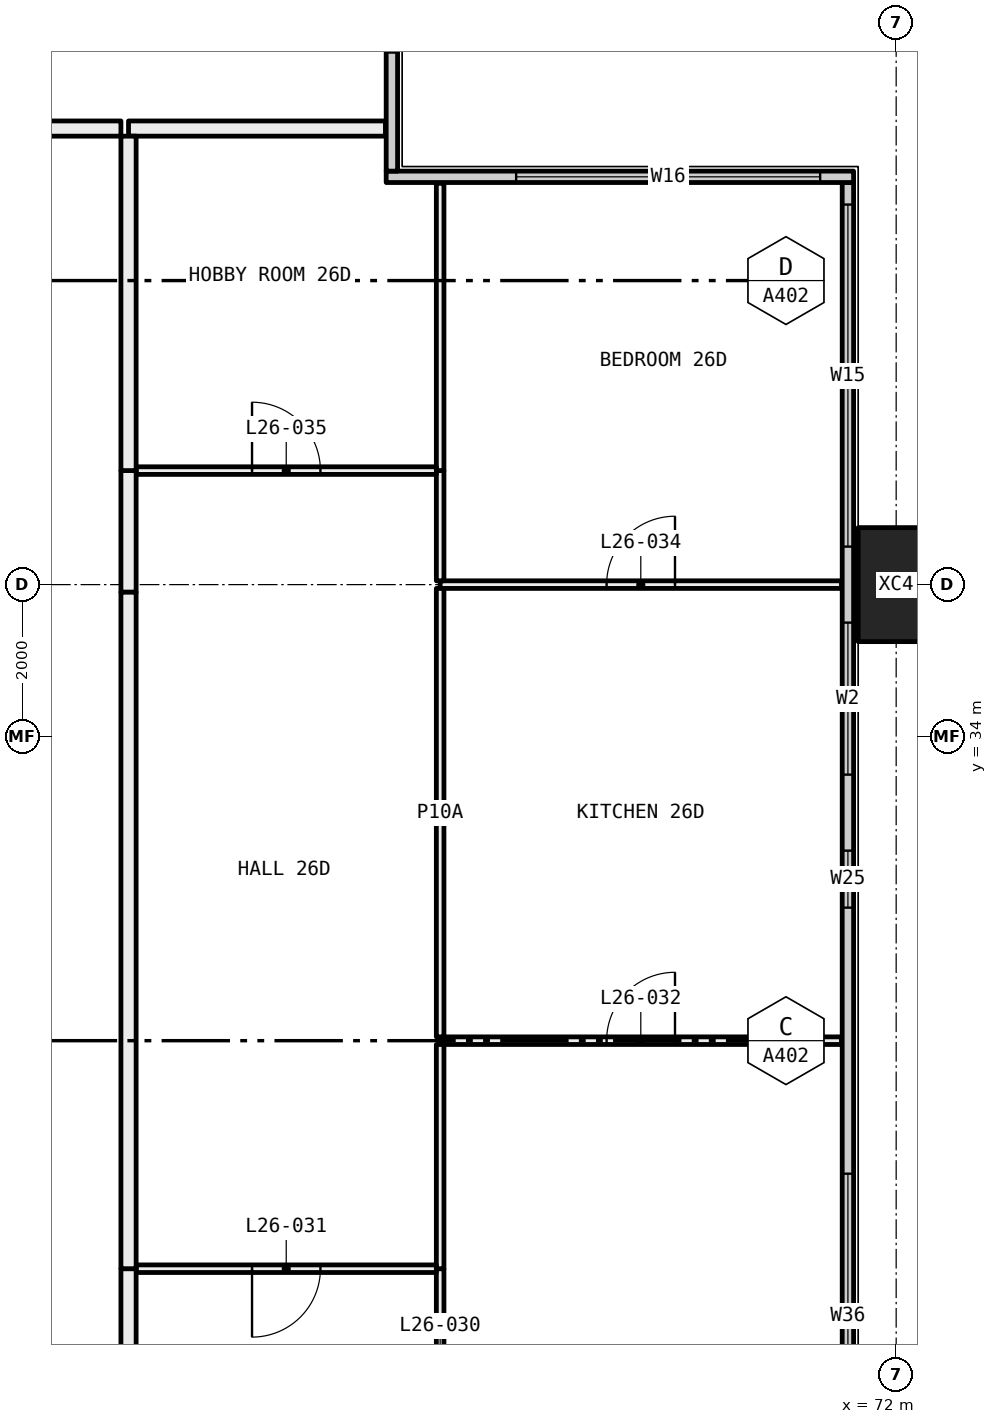
"""IFC4 building model, lengths in metres.
Left out: names, types, materials, properties, quantities, classifications, styles, units other than length and angle.
Written with IfcOpenShell. Run it as: python <this file> out.ifc"""

import sys

from ifc_helpers import new_model, si_unit, direction, frame, frame_2d, origin, origin_2d, place, context, subcontext, project, spatial, rectangle, hollow_rectangle, extrude, element, fill, save


model = new_model("IFC4")
c1 = context("Model", 3, precision=1e-05, world=origin(), true_north=direction((0.0, 1.0)))
c2 = subcontext(c1, "Body", "Model", "MODEL_VIEW")
j1 = project(units=[si_unit("LENGTHUNIT", "METRE"), si_unit("PLANEANGLEUNIT", "RADIAN")], contexts=[c1])
p1 = place(None, origin())
s1 = spatial("IfcSite", under=j1, at=p1, CompositionType="ELEMENT")
p2 = place(p1, origin())
s2 = spatial("IfcBuilding", under=s1, at=p2, CompositionType="ELEMENT")
p3 = place(p2, frame((0.0, 0.0, 103.5)))
s3 = spatial("IfcBuildingStorey", under=s2, at=p3, CompositionType="ELEMENT", Elevation=103.5)
p4 = place(p3, frame((72.0, 36.0, -0.4), z_axis=(0.0, 0.0, 1.0), x_axis=(0.0, 1.0, 0.0)))
e1 = element("IfcColumn", 1, at=p4, inside=s3, PredefinedType="COLUMN", context=c2, shape_type="SweptSolid", body=[
    extrude(hollow_rectangle(XDim=1.5, YDim=1.0, WallThickness=0.06, at=origin_2d()), origin(), (0.0, 0.0, 1.0), 3.45),
])
p5 = place(p3, frame((71.365, 18.71, 0.0), z_axis=(0.0, 0.0, 1.0), x_axis=(0.0, 1.0, 0.0)))
e2 = element("IfcWall", 2, at=p5, inside=s3, PredefinedType="ELEMENTEDWALL", context=c2, shape_type="SweptSolid", body=[
    extrude(rectangle(XDim=22.58, YDim=0.15, at=frame_2d((11.29, 0.0))), origin(), (0.0, 0.0, 1.0), 3.05),
])
p6 = place(p5, frame((0.29, 0.0, 0.45)))
e3 = element("IfcOpeningElement", 3, at=p6, cuts=e2, PredefinedType="OPENING", context=c2, shape_type="SweptSolid", body=[
    extrude(rectangle(XDim=4.5, YDim=2.55, at=frame_2d((2.25, 1.275))), frame((0.0, 0.085, 0.0), z_axis=(0.0, -1.0, 0.0), x_axis=(1.0, 0.0, 0.0)), (0.0, 0.0, 1.0), 0.17),
])
p7 = place(p5, frame((5.79, 0.0, 0.45)))
e4 = element("IfcOpeningElement", 4, at=p7, cuts=e2, PredefinedType="OPENING", context=c2, shape_type="SweptSolid", body=[
    extrude(rectangle(XDim=3.75, YDim=2.55, at=frame_2d((1.875, 1.275))), frame((0.0, 0.085, 0.0), z_axis=(0.0, -1.0, 0.0), x_axis=(1.0, 0.0, 0.0)), (0.0, 0.0, 1.0), 0.17),
])
p8 = place(p5, frame((13.04, 0.0, 0.45)))
e5 = element("IfcOpeningElement", 5, at=p8, cuts=e2, PredefinedType="OPENING", context=c2, shape_type="SweptSolid", body=[
    extrude(rectangle(XDim=0.75, YDim=2.55, at=frame_2d((0.375, 1.275))), frame((0.0, 0.085, 0.0), z_axis=(0.0, -1.0, 0.0), x_axis=(1.0, 0.0, 0.0)), (0.0, 0.0, 1.0), 0.17),
])
p9 = place(p5, frame((14.79, 0.0, 0.45)))
e6 = element("IfcOpeningElement", 6, at=p9, cuts=e2, PredefinedType="OPENING", context=c2, shape_type="SweptSolid", body=[
    extrude(rectangle(XDim=2.0, YDim=2.55, at=frame_2d((1.0, 1.275))), frame((0.0, 0.085, 0.0), z_axis=(0.0, -1.0, 0.0), x_axis=(1.0, 0.0, 0.0)), (0.0, 0.0, 1.0), 0.17),
])
p10 = place(p5, frame((17.79, 0.0, 0.45)))
e7 = element("IfcOpeningElement", 7, at=p10, cuts=e2, PredefinedType="OPENING", context=c2, shape_type="SweptSolid", body=[
    extrude(rectangle(XDim=4.5, YDim=2.55, at=frame_2d((2.25, 1.275))), frame((0.0, 0.085, 0.0), z_axis=(0.0, -1.0, 0.0), x_axis=(1.0, 0.0, 0.0)), (0.0, 0.0, 1.0), 0.17),
])
p11 = place(p3, frame((65.29, 41.365, 0.0), z_axis=(0.0, 0.0, 1.0), x_axis=(1.0, 0.0, 0.0)))
e8 = element("IfcWall", 8, at=p11, inside=s3, PredefinedType="ELEMENTEDWALL", context=c2, shape_type="SweptSolid", body=[
    extrude(rectangle(XDim=6.15, YDim=0.15, at=frame_2d((3.075, 0.0))), origin(), (0.0, 0.0, 1.0), 3.05),
])
p12 = place(p11, frame((1.71, 0.0, 0.45)))
e9 = element("IfcOpeningElement", 9, at=p12, cuts=e8, PredefinedType="OPENING", context=c2, shape_type="SweptSolid", body=[
    extrude(rectangle(XDim=4.0, YDim=2.55, at=frame_2d((2.0, 1.275))), frame((0.0, 0.085, 0.0), z_axis=(0.0, -1.0, 0.0), x_axis=(1.0, 0.0, 0.0)), (0.0, 0.0, 1.0), 0.17),
])
p13 = place(p3, frame((65.365, 41.44, 0.0), z_axis=(0.0, 0.0, 1.0), x_axis=(0.0, 1.0, 0.0)))
e10 = element("IfcWall", 10, at=p13, inside=s3, PredefinedType="ELEMENTEDWALL", context=c2, shape_type="SweptSolid", body=[
    extrude(rectangle(XDim=5.85, YDim=0.15, at=frame_2d((2.925, 0.0))), origin(), (0.0, 0.0, 1.0), 3.05),
])
p14 = place(p13, frame((1.56, 0.0, 0.45)))
e11 = element("IfcOpeningElement", 11, at=p14, cuts=e10, PredefinedType="OPENING", context=c2, shape_type="SweptSolid", body=[
    extrude(rectangle(XDim=4.0, YDim=2.55, at=frame_2d((2.0, 1.275))), frame((0.0, 0.085, 0.0), z_axis=(0.0, -1.0, 0.0), x_axis=(1.0, 0.0, 0.0)), (0.0, 0.0, 1.0), 0.17),
])
p15 = place(p3, frame((71.28, 30.0, 0.0), z_axis=(0.0, 0.0, 1.0), x_axis=(-1.0, 0.0, 0.0)))
e12 = element("IfcWall", 12, at=p15, inside=s3, PredefinedType="PARTITIONING", context=c2, shape_type="SweptSolid", body=[
    extrude(rectangle(XDim=5.28, YDim=0.1, at=frame_2d((2.64, 0.0))), origin(), (0.0, 0.0, 1.0), 3.05),
])
p16 = place(p15, frame((2.19, 0.0, 0.0)))
e13 = element("IfcOpeningElement", 13, at=p16, cuts=e12, PredefinedType="OPENING", context=c2, shape_type="SweptSolid", body=[
    extrude(rectangle(XDim=0.9, YDim=2.1, at=frame_2d((0.45, 1.05))), frame((0.0, 0.06, 0.0), z_axis=(0.0, -1.0, 0.0), x_axis=(1.0, 0.0, 0.0)), (0.0, 0.0, 1.0), 0.12),
])
p17 = place(p3, frame((66.0, 27.0, 0.0), z_axis=(0.0, 0.0, 1.0), x_axis=(0.0, -1.0, 0.0)))
e14 = element("IfcWall", 14, at=p17, inside=s3, PredefinedType="PARTITIONING", context=c2, shape_type="SweptSolid", body=[
    extrude(rectangle(XDim=3.1, YDim=0.1, at=frame_2d((1.55, 0.0))), origin(), (0.0, 0.0, 1.0), 2.45),
])
p18 = place(p17, frame((1.1, 0.0, 0.0)))
e15 = element("IfcOpeningElement", 15, at=p18, cuts=e14, PredefinedType="OPENING", context=c2, shape_type="SweptSolid", body=[
    extrude(rectangle(XDim=0.9, YDim=2.1, at=frame_2d((0.45, 1.05))), frame((0.0, 0.06, 0.0), z_axis=(0.0, -1.0, 0.0), x_axis=(1.0, 0.0, 0.0)), (0.0, 0.0, 1.0), 0.12),
])
p19 = place(p3, frame((66.0, 29.95, 0.0), z_axis=(0.0, 0.0, 1.0), x_axis=(0.0, -1.0, 0.0)))
e16 = element("IfcWall", 16, at=p19, inside=s3, PredefinedType="PARTITIONING", context=c2, shape_type="SweptSolid", body=[
    extrude(rectangle(XDim=2.95, YDim=0.1, at=frame_2d((1.475, 0.0))), origin(), (0.0, 0.0, 1.0), 3.05),
])
p20 = place(p3, frame((71.28, 36.0, 0.0), z_axis=(0.0, 0.0, 1.0), x_axis=(-1.0, 0.0, 0.0)))
e17 = element("IfcWall", 17, at=p20, inside=s3, PredefinedType="PARTITIONING", context=c2, shape_type="SweptSolid", body=[
    extrude(rectangle(XDim=5.28, YDim=0.1, at=frame_2d((2.64, 0.0))), origin(), (0.0, 0.0, 1.0), 2.45),
])
p21 = place(p20, frame((2.19, 0.0, 0.0)))
e18 = element("IfcOpeningElement", 18, at=p21, cuts=e17, PredefinedType="OPENING", context=c2, shape_type="SweptSolid", body=[
    extrude(rectangle(XDim=0.9, YDim=2.1, at=frame_2d((0.45, 1.05))), frame((0.0, 0.06, 0.0), z_axis=(0.0, -1.0, 0.0), x_axis=(1.0, 0.0, 0.0)), (0.0, 0.0, 1.0), 0.12),
])
p22 = place(p3, frame((66.0, 35.95, 0.0), z_axis=(0.0, 0.0, 1.0), x_axis=(0.0, -1.0, 0.0)))
e19 = element("IfcWall", 19, at=p22, inside=s3, PredefinedType="PARTITIONING", context=c2, shape_type="SweptSolid", body=[
    extrude(rectangle(XDim=5.9, YDim=0.1, at=frame_2d((2.95, 0.0))), origin(), (0.0, 0.0, 1.0), 2.45),
])
p23 = place(p3, frame((66.0, 37.5, 0.0), z_axis=(0.0, 0.0, 1.0), x_axis=(0.0, -1.0, 0.0)))
e20 = element("IfcWall", 20, at=p23, inside=s3, PredefinedType="PARTITIONING", context=c2, shape_type="SweptSolid", body=[
    extrude(rectangle(XDim=1.45, YDim=0.1, at=frame_2d((0.725, 0.0))), origin(), (0.0, 0.0, 1.0), 2.45),
])
p24 = place(p3, frame((66.0, 41.28, 0.0), z_axis=(0.0, 0.0, 1.0), x_axis=(0.0, -1.0, 0.0)))
e21 = element("IfcWall", 21, at=p24, inside=s3, PredefinedType="PARTITIONING", context=c2, shape_type="SweptSolid", body=[
    extrude(rectangle(XDim=3.78, YDim=0.1, at=frame_2d((1.89, 0.0))), origin(), (0.0, 0.0, 1.0), 3.05),
])
p25 = place(p3, frame((65.95, 27.0, 0.0), z_axis=(0.0, 0.0, 1.0), x_axis=(-1.0, 0.0, 0.0)))
e22 = element("IfcWall", 22, at=p25, inside=s3, PredefinedType="PARTITIONING", context=c2, shape_type="SweptSolid", body=[
    extrude(rectangle(XDim=3.95, YDim=0.1, at=frame_2d((1.975, 0.0))), origin(), (0.0, 0.0, 1.0), 3.05),
])
p26 = place(p25, frame((1.525, 0.0, 0.0)))
e23 = element("IfcOpeningElement", 23, at=p26, cuts=e22, PredefinedType="OPENING", context=c2, shape_type="SweptSolid", body=[
    extrude(rectangle(XDim=0.9, YDim=2.1, at=frame_2d((0.45, 1.05))), frame((0.0, 0.06, 0.0), z_axis=(0.0, -1.0, 0.0), x_axis=(1.0, 0.0, 0.0)), (0.0, 0.0, 1.0), 0.12),
])
p27 = place(p3, frame((61.9, 27.0, 0.0), z_axis=(0.0, 0.0, 1.0), x_axis=(0.0, -1.0, 0.0)))
e24 = element("IfcWall", 24, at=p27, inside=s3, PredefinedType="PARTITIONING", context=c2, shape_type="SweptSolid", body=[
    extrude(rectangle(XDim=3.1, YDim=0.2, at=frame_2d((1.55, 0.0))), origin(), (0.0, 0.0, 1.0), 2.45),
])
p28 = place(p27, frame((1.05, 0.0, 0.0)))
e25 = element("IfcOpeningElement", 25, at=p28, cuts=e24, PredefinedType="OPENING", context=c2, shape_type="SweptSolid", body=[
    extrude(rectangle(XDim=1.0, YDim=2.1, at=frame_2d((0.5, 1.05))), frame((0.0, 0.11, 0.0), z_axis=(0.0, -1.0, 0.0), x_axis=(1.0, 0.0, 0.0)), (0.0, 0.0, 1.0), 0.22),
])
p29 = place(p3, frame((65.95, 37.5, 0.0), z_axis=(0.0, 0.0, 1.0), x_axis=(-1.0, 0.0, 0.0)))
e26 = element("IfcWall", 26, at=p29, inside=s3, PredefinedType="PARTITIONING", context=c2, shape_type="SweptSolid", body=[
    extrude(rectangle(XDim=3.95, YDim=0.1, at=frame_2d((1.975, 0.0))), origin(), (0.0, 0.0, 1.0), 3.05),
])
p30 = place(p29, frame((1.525, 0.0, 0.0)))
e27 = element("IfcOpeningElement", 27, at=p30, cuts=e26, PredefinedType="OPENING", context=c2, shape_type="SweptSolid", body=[
    extrude(rectangle(XDim=0.9, YDim=2.1, at=frame_2d((0.45, 1.05))), frame((0.0, 0.06, 0.0), z_axis=(0.0, -1.0, 0.0), x_axis=(1.0, 0.0, 0.0)), (0.0, 0.0, 1.0), 0.12),
])
p31 = place(p3, frame((61.9, 37.5, 0.0), z_axis=(0.0, 0.0, 1.0), x_axis=(0.0, -1.0, 0.0)))
e28 = element("IfcWall", 28, at=p31, inside=s3, PredefinedType="PARTITIONING", context=c2, shape_type="SweptSolid", body=[
    extrude(rectangle(XDim=1.6, YDim=0.2, at=frame_2d((0.8, 0.0))), origin(), (0.0, 0.0, 1.0), 2.45),
])
p32 = place(p3, frame((61.9, 35.9, 0.0), z_axis=(0.0, 0.0, 1.0), x_axis=(0.0, -1.0, 0.0)))
e29 = element("IfcWall", 29, at=p32, inside=s3, PredefinedType="PARTITIONING", context=c2, shape_type="SweptSolid", body=[
    extrude(rectangle(XDim=8.9, YDim=0.2, at=frame_2d((4.45, 0.0))), origin(), (0.0, 0.0, 1.0), 3.05),
])
p33 = place(p3, frame((65.28, 42.0, 0.0), z_axis=(0.0, 0.0, 1.0), x_axis=(-1.0, 0.0, 0.0)))
e30 = element("IfcWall", 30, at=p33, inside=s3, PredefinedType="PARTITIONING", context=c2, shape_type="SweptSolid", body=[
    extrude(rectangle(XDim=3.38, YDim=0.2, at=frame_2d((1.69, 0.0))), origin(), (0.0, 0.0, 1.0), 3.05),
])
p34 = place(p3, frame((61.9, 41.9, 0.0), z_axis=(0.0, 0.0, 1.0), x_axis=(0.0, -1.0, 0.0)))
e31 = element("IfcWall", 31, at=p34, inside=s3, PredefinedType="PARTITIONING", context=c2, shape_type="SweptSolid", body=[
    extrude(rectangle(XDim=4.4, YDim=0.2, at=frame_2d((2.2, 0.0))), origin(), (0.0, 0.0, 1.0), 3.05),
])
p35 = place(p3, frame((60.0, 42.0, 0.0), z_axis=(0.0, 0.0, 1.0), x_axis=(1.0, 0.0, 0.0)))
e32 = element("IfcWall", 32, at=p35, inside=s3, PredefinedType="PARTITIONING", context=c2, shape_type="SweptSolid", body=[
    extrude(rectangle(XDim=1.8, YDim=0.2, at=frame_2d((0.9, 0.0))), origin(), (0.0, 0.0, 1.0), 3.05),
])
p36 = place(p7, origin())
e33 = element("IfcWindow", 33, at=p36, inside=s3, PartitioningType="SINGLE_PANEL", PredefinedType="WINDOW", context=c2, shape_type="SweptSolid", body=[
    extrude(rectangle(XDim=3.75, YDim=2.55, at=frame_2d((1.875, 1.275))), frame((0.0, 0.03, 0.0), z_axis=(0.0, -1.0, 0.0), x_axis=(1.0, 0.0, 0.0)), (0.0, 0.0, 1.0), 0.06),
])
fill(e4, e33)
p37 = place(p8, origin())
e34 = element("IfcWindow", 34, at=p37, inside=s3, PartitioningType="SINGLE_PANEL", PredefinedType="WINDOW", context=c2, shape_type="SweptSolid", body=[
    extrude(rectangle(XDim=0.75, YDim=2.55, at=frame_2d((0.375, 1.275))), frame((0.0, 0.03, 0.0), z_axis=(0.0, -1.0, 0.0), x_axis=(1.0, 0.0, 0.0)), (0.0, 0.0, 1.0), 0.06),
])
fill(e5, e34)
p38 = place(p9, origin())
e35 = element("IfcWindow", 35, at=p38, inside=s3, PartitioningType="SINGLE_PANEL", PredefinedType="WINDOW", context=c2, shape_type="SweptSolid", body=[
    extrude(rectangle(XDim=2.0, YDim=2.55, at=frame_2d((1.0, 1.275))), frame((0.0, 0.03, 0.0), z_axis=(0.0, -1.0, 0.0), x_axis=(1.0, 0.0, 0.0)), (0.0, 0.0, 1.0), 0.06),
])
fill(e6, e35)
p39 = place(p10, origin())
e36 = element("IfcWindow", 36, at=p39, inside=s3, PartitioningType="SINGLE_PANEL", PredefinedType="WINDOW", context=c2, shape_type="SweptSolid", body=[
    extrude(rectangle(XDim=4.5, YDim=2.55, at=frame_2d((2.25, 1.275))), frame((0.0, 0.03, 0.0), z_axis=(0.0, -1.0, 0.0), x_axis=(1.0, 0.0, 0.0)), (0.0, 0.0, 1.0), 0.06),
])
fill(e7, e36)
p40 = place(p12, origin())
e37 = element("IfcWindow", 37, at=p40, inside=s3, PartitioningType="SINGLE_PANEL", PredefinedType="WINDOW", context=c2, shape_type="SweptSolid", body=[
    extrude(rectangle(XDim=4.0, YDim=2.55, at=frame_2d((2.0, 1.275))), frame((0.0, 0.03, 0.0), z_axis=(0.0, -1.0, 0.0), x_axis=(1.0, 0.0, 0.0)), (0.0, 0.0, 1.0), 0.06),
])
fill(e9, e37)
p41 = place(p26, origin())
e38 = element("IfcDoor", 38, at=p41, inside=s3, OperationType="SINGLE_SWING_LEFT", PredefinedType="DOOR", context=c2, shape_type="SweptSolid", body=[
    extrude(rectangle(XDim=0.9, YDim=2.1, at=frame_2d((0.45, 1.05))), frame((0.0, 0.025, 0.0), z_axis=(0.0, -1.0, 0.0), x_axis=(1.0, 0.0, 0.0)), (0.0, 0.0, 1.0), 0.05),
])
fill(e23, e38)
p42 = place(p16, frame((0.9, 0.0, 0.0), x_axis=(-1.0, 0.0, 0.0)))
e39 = element("IfcDoor", 39, at=p42, inside=s3, OperationType="SINGLE_SWING_LEFT", PredefinedType="DOOR", context=c2, shape_type="SweptSolid", body=[
    extrude(rectangle(XDim=0.9, YDim=2.1, at=frame_2d((0.45, 1.05))), frame((0.0, 0.025, 0.0), z_axis=(0.0, -1.0, 0.0), x_axis=(1.0, 0.0, 0.0)), (0.0, 0.0, 1.0), 0.05),
])
fill(e13, e39)
p43 = place(p21, frame((0.9, 0.0, 0.0), x_axis=(-1.0, 0.0, 0.0)))
e40 = element("IfcDoor", 40, at=p43, inside=s3, OperationType="SINGLE_SWING_LEFT", PredefinedType="DOOR", context=c2, shape_type="SweptSolid", body=[
    extrude(rectangle(XDim=0.9, YDim=2.1, at=frame_2d((0.45, 1.05))), frame((0.0, 0.025, 0.0), z_axis=(0.0, -1.0, 0.0), x_axis=(1.0, 0.0, 0.0)), (0.0, 0.0, 1.0), 0.05),
])
fill(e18, e40)
p44 = place(p30, frame((0.9, 0.0, 0.0), x_axis=(-1.0, 0.0, 0.0)))
e41 = element("IfcDoor", 41, at=p44, inside=s3, OperationType="SINGLE_SWING_RIGHT", PredefinedType="DOOR", context=c2, shape_type="SweptSolid", body=[
    extrude(rectangle(XDim=0.9, YDim=2.1, at=frame_2d((0.45, 1.05))), frame((0.0, 0.025, 0.0), z_axis=(0.0, -1.0, 0.0), x_axis=(1.0, 0.0, 0.0)), (0.0, 0.0, 1.0), 0.05),
])
fill(e27, e41)
save(model, sys.argv[1])
